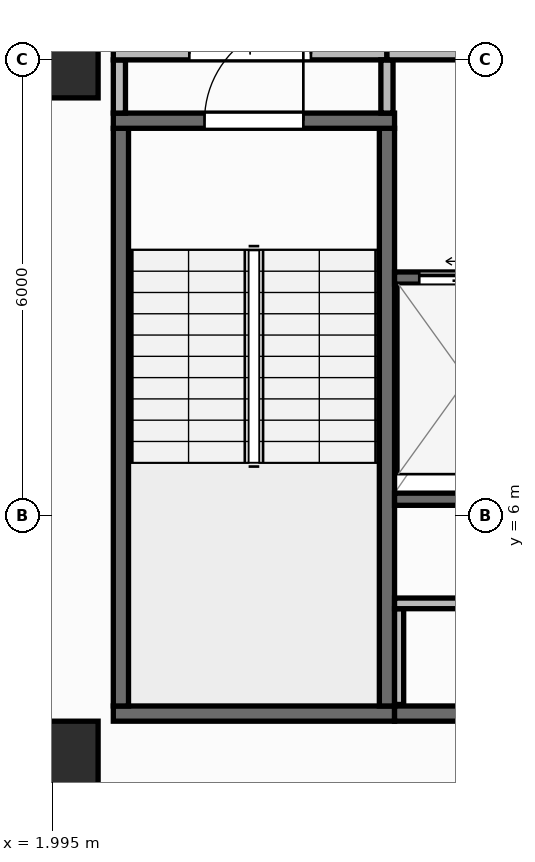
"""IFC4 building model, lengths in metres.
Left out: names, types, materials, properties, quantities, classifications, styles, units other than length and angle.
Written with IfcOpenShell. Run it as: python <this file> out.ifc"""

import sys

from ifc_helpers import new_model, si_unit, direction, frame, frame_2d, origin, origin_2d, place, context, subcontext, project, spatial, rectangle, extrude, element, fill, save


model = new_model("IFC4")
c1 = context("Model", 3, precision=1e-05, world=origin(), true_north=direction((0.0, 1.0)))
c2 = subcontext(c1, "Body", "Model", "MODEL_VIEW")
j1 = project(units=[si_unit("LENGTHUNIT", "METRE"), si_unit("PLANEANGLEUNIT", "RADIAN")], contexts=[c1])
p1 = place(None, origin())
s1 = spatial("IfcSite", under=j1, at=p1, CompositionType="ELEMENT")
p2 = place(p1, origin())
s2 = spatial("IfcBuilding", under=s1, at=p2, CompositionType="ELEMENT")
p3 = place(p2, frame((0.0, 0.0, 192.1)))
s3 = spatial("IfcBuildingStorey", under=s2, at=p3, CompositionType="ELEMENT", Elevation=192.1)
for number, where, z_axis, x_axis in (
    (1, (2.1, 2.8, 0.0), (0.0, 0.0, 1.0), (1.0, 0.0, 0.0)),
    (2, (2.1, 12.0, 0.0), (0.0, 0.0, 1.0), (1.0, 0.0, 0.0)),
):
    element("IfcColumn", number, at=place(p3, frame(where, z_axis=z_axis, x_axis=x_axis)), inside=s3, PredefinedType="COLUMN", context=c2, shape_type="SweptSolid", body=[
        extrude(rectangle(XDim=1.0, YDim=1.0, at=origin_2d()), origin(), (0.0, 0.0, 1.0), 3.95),
    ])
p4 = place(p3, frame((2.66, 0.174, 0.0), z_axis=(0.0, 0.0, 1.0), x_axis=(0.996634028439, 0.081979347142, 0.0)))
e3 = element("IfcWall", 3, at=p4, inside=s3, PredefinedType="STANDARD", context=c2, shape_type="SweptSolid", body=[
    extrude(rectangle(XDim=46.035, YDim=0.26, at=frame_2d((23.018, 0.0))), origin(), (0.0, 0.0, 1.0), 3.71),
])
p5 = place(p4, frame((21.817, 0.0, 0.9)))
e4 = element("IfcOpeningElement", 4, at=p5, cuts=e3, PredefinedType="OPENING", context=c2, shape_type="SweptSolid", body=[
    extrude(rectangle(XDim=2.4, YDim=1.65, at=frame_2d((1.2, 0.825))), frame((0.0, 0.14, 0.0), z_axis=(0.0, -1.0, 0.0), x_axis=(1.0, 0.0, 0.0)), (0.0, 0.0, 1.0), 0.28),
])
p6 = place(p3, frame((2.8, 3.4, 0.0), z_axis=(0.0, 0.0, 1.0), x_axis=(1.0, 0.0, 0.0)))
e5 = element("IfcWall", 5, at=p6, inside=s3, PredefinedType="SHEAR", context=c2, shape_type="SweptSolid", body=[
    extrude(rectangle(XDim=3.7, YDim=0.2, at=frame_2d((1.85, 0.0))), origin(), (0.0, 0.0, 1.0), 3.71),
])
for number, where, z_axis, x_axis in (
    (6, (2.9, 3.5, 0.0), (0.0, 0.0, 1.0), (0.0, 1.0, 0.0)),
    (7, (6.4, 3.5, 0.0), (0.0, 0.0, 1.0), (0.0, 1.0, 0.0)),
):
    element("IfcWall", number, at=place(p3, frame(where, z_axis=z_axis, x_axis=x_axis)), inside=s3, PredefinedType="SHEAR", context=c2, shape_type="SweptSolid", body=[
        extrude(rectangle(XDim=7.6, YDim=0.2, at=frame_2d((3.8, 0.0))), origin(), (0.0, 0.0, 1.0), 3.71),
    ])
p7 = place(p3, frame((2.8, 11.2, 0.0), z_axis=(0.0, 0.0, 1.0), x_axis=(1.0, 0.0, 0.0)))
e8 = element("IfcWall", 8, at=p7, inside=s3, PredefinedType="SHEAR", context=c2, shape_type="SweptSolid", body=[
    extrude(rectangle(XDim=3.7, YDim=0.2, at=frame_2d((1.85, 0.0))), origin(), (0.0, 0.0, 1.0), 3.71),
])
p8 = place(p7, frame((1.2, 0.0, 0.0)))
e9 = element("IfcOpeningElement", 9, at=p8, cuts=e8, PredefinedType="OPENING", context=c2, shape_type="SweptSolid", body=[
    extrude(rectangle(XDim=1.3, YDim=2.15, at=frame_2d((0.65, 1.075))), frame((0.0, 0.11, 0.0), z_axis=(0.0, -1.0, 0.0), x_axis=(1.0, 0.0, 0.0)), (0.0, 0.0, 1.0), 0.22),
])
p9 = place(p3, frame((6.5, 3.4, 0.0), z_axis=(0.0, 0.0, 1.0), x_axis=(1.0, 0.0, 0.0)))
e10 = element("IfcWall", 10, at=p9, inside=s3, PredefinedType="SHEAR", context=c2, shape_type="SweptSolid", body=[
    extrude(rectangle(XDim=13.7, YDim=0.2, at=frame_2d((6.85, 0.0))), origin(), (0.0, 0.0, 1.0), 3.71),
])
p10 = place(p3, frame((6.5, 6.22, 0.0), z_axis=(0.0, 0.0, 1.0), x_axis=(1.0, 0.0, 0.0)))
e11 = element("IfcWall", 11, at=p10, inside=s3, PredefinedType="SHEAR", context=c2, shape_type="SweptSolid", body=[
    extrude(rectangle(XDim=12.11, YDim=0.16, at=frame_2d((6.055, 0.0))), origin(), (0.0, 0.0, 1.0), 3.71),
])
p11 = place(p3, frame((6.5, 9.13, 0.0), z_axis=(0.0, 0.0, 1.0), x_axis=(1.0, 0.0, 0.0)))
e12 = element("IfcWall", 12, at=p11, inside=s3, PredefinedType="SHEAR", context=c2, shape_type="SweptSolid", body=[
    extrude(rectangle(XDim=1.975, YDim=0.16, at=frame_2d((0.988, 0.0))), origin(), (0.0, 0.0, 1.0), 3.71),
])
p12 = place(p11, frame((0.325, 0.0, 0.0)))
e13 = element("IfcOpeningElement", 13, at=p12, cuts=e12, PredefinedType="OPENING", context=c2, shape_type="SweptSolid", body=[
    extrude(rectangle(XDim=1.25, YDim=2.15, at=frame_2d((0.625, 1.075))), frame((0.0, 0.09, 0.0), z_axis=(0.0, -1.0, 0.0), x_axis=(1.0, 0.0, 0.0)), (0.0, 0.0, 1.0), 0.18),
])
p13 = place(p3, frame((6.56, 3.52, 0.0), z_axis=(0.0, 0.0, 1.0), x_axis=(0.0, 1.0, 0.0)))
e14 = element("IfcWall", 14, at=p13, inside=s3, PredefinedType="PARTITIONING", context=c2, shape_type="SweptSolid", body=[
    extrude(rectangle(XDim=1.26, YDim=0.12, at=frame_2d((0.63, 0.0))), origin(), (0.0, 0.0, 1.0), 3.71),
])
p14 = place(p3, frame((6.5, 4.85, 0.0), z_axis=(0.0, 0.0, 1.0), x_axis=(1.0, 0.0, 0.0)))
e15 = element("IfcWall", 15, at=p14, inside=s3, PredefinedType="PARTITIONING", context=c2, shape_type="SweptSolid", body=[
    extrude(rectangle(XDim=5.67, YDim=0.14, at=frame_2d((2.835, 0.0))), origin(), (0.0, 0.0, 1.0), 3.71),
])
p15 = place(p14, frame((2.285, 0.0, 0.0)))
e16 = element("IfcOpeningElement", 16, at=p15, cuts=e15, PredefinedType="OPENING", context=c2, shape_type="SweptSolid", body=[
    extrude(rectangle(XDim=1.1, YDim=2.1, at=frame_2d((0.55, 1.05))), frame((0.0, 0.08, 0.0), z_axis=(0.0, -1.0, 0.0), x_axis=(1.0, 0.0, 0.0)), (0.0, 0.0, 1.0), 0.16),
])
p16 = place(p3, frame((2.88, 11.3, 0.0), z_axis=(0.0, 0.0, 1.0), x_axis=(0.0, 1.0, 0.0)))
e17 = element("IfcWall", 17, at=p16, inside=s3, PredefinedType="PARTITIONING", context=c2, shape_type="SweptSolid", body=[
    extrude(rectangle(XDim=0.7, YDim=0.16, at=frame_2d((0.35, 0.0))), origin(), (0.0, 0.0, 1.0), 3.71),
])
p17 = place(p3, frame((2.8, 12.08, 0.0), z_axis=(0.0, 0.0, 1.0), x_axis=(1.0, 0.0, 0.0)))
e18 = element("IfcWall", 18, at=p17, inside=s3, PredefinedType="PARTITIONING", context=c2, shape_type="SweptSolid", body=[
    extrude(rectangle(XDim=3.6, YDim=0.16, at=frame_2d((1.8, 0.0))), origin(), (0.0, 0.0, 1.0), 3.152),
])
p18 = place(p17, frame((1.0, 0.0, 0.0)))
e19 = element("IfcOpeningElement", 19, at=p18, cuts=e18, PredefinedType="OPENING", context=c2, shape_type="SweptSolid", body=[
    extrude(rectangle(XDim=1.6, YDim=2.05, at=frame_2d((0.8, 1.025))), frame((0.0, 0.09, 0.0), z_axis=(0.0, -1.0, 0.0), x_axis=(1.0, 0.0, 0.0)), (0.0, 0.0, 1.0), 0.18),
])
p19 = place(p3, frame((6.4, 11.3, 0.0), z_axis=(0.0, 0.0, 1.0), x_axis=(0.0, 1.0, 0.0)))
e20 = element("IfcWall", 20, at=p19, inside=s3, PredefinedType="PARTITIONING", context=c2, shape_type="SweptSolid", body=[
    extrude(rectangle(XDim=0.7, YDim=0.16, at=frame_2d((0.35, 0.0))), origin(), (0.0, 0.0, 1.0), 3.71),
])
p20 = place(p3, frame((6.4, 12.08, 0.0), z_axis=(0.0, 0.0, 1.0), x_axis=(1.0, 0.0, 0.0)))
e21 = element("IfcWall", 21, at=p20, inside=s3, PredefinedType="PARTITIONING", context=c2, shape_type="SweptSolid", body=[
    extrude(rectangle(XDim=6.18, YDim=0.16, at=frame_2d((3.09, 0.0))), origin(), (0.0, 0.0, 1.0), 3.152),
])
p21 = place(p20, frame((2.29, 0.0, 0.0)))
e22 = element("IfcOpeningElement", 22, at=p21, cuts=e21, PredefinedType="OPENING", context=c2, shape_type="SweptSolid", body=[
    extrude(rectangle(XDim=1.6, YDim=2.05, at=frame_2d((0.8, 1.025))), frame((0.0, 0.09, 0.0), z_axis=(0.0, -1.0, 0.0), x_axis=(1.0, 0.0, 0.0)), (0.0, 0.0, 1.0), 0.18),
])
p22 = place(p8, origin())
e23 = element("IfcDoor", 23, at=p22, inside=s3, OperationType="SINGLE_SWING_RIGHT", PredefinedType="DOOR", context=c2, shape_type="SweptSolid", body=[
    extrude(rectangle(XDim=1.3, YDim=2.15, at=frame_2d((0.65, 1.075))), frame((0.0, 0.025, 0.0), z_axis=(0.0, -1.0, 0.0), x_axis=(1.0, 0.0, 0.0)), (0.0, 0.0, 1.0), 0.05),
])
fill(e9, e23)
p23 = place(p12, origin())
e24 = element("IfcDoor", 24, at=p23, inside=s3, OperationType="SLIDING_TO_LEFT", PredefinedType="DOOR", context=c2, shape_type="SweptSolid", body=[
    extrude(rectangle(XDim=1.25, YDim=2.15, at=frame_2d((0.625, 1.075))), frame((0.0, 0.025, 0.0), z_axis=(0.0, -1.0, 0.0), x_axis=(1.0, 0.0, 0.0)), (0.0, 0.0, 1.0), 0.05),
])
fill(e13, e24)
p24 = place(p18, origin())
e25 = element("IfcDoor", 25, at=p24, inside=s3, OperationType="DOUBLE_DOOR_SINGLE_SWING", PredefinedType="DOOR", context=c2, shape_type="SweptSolid", body=[
    extrude(rectangle(XDim=1.6, YDim=2.05, at=frame_2d((0.8, 1.025))), frame((0.0, 0.025, 0.0), z_axis=(0.0, -1.0, 0.0), x_axis=(1.0, 0.0, 0.0)), (0.0, 0.0, 1.0), 0.05),
])
fill(e19, e25)
save(model, sys.argv[1])
